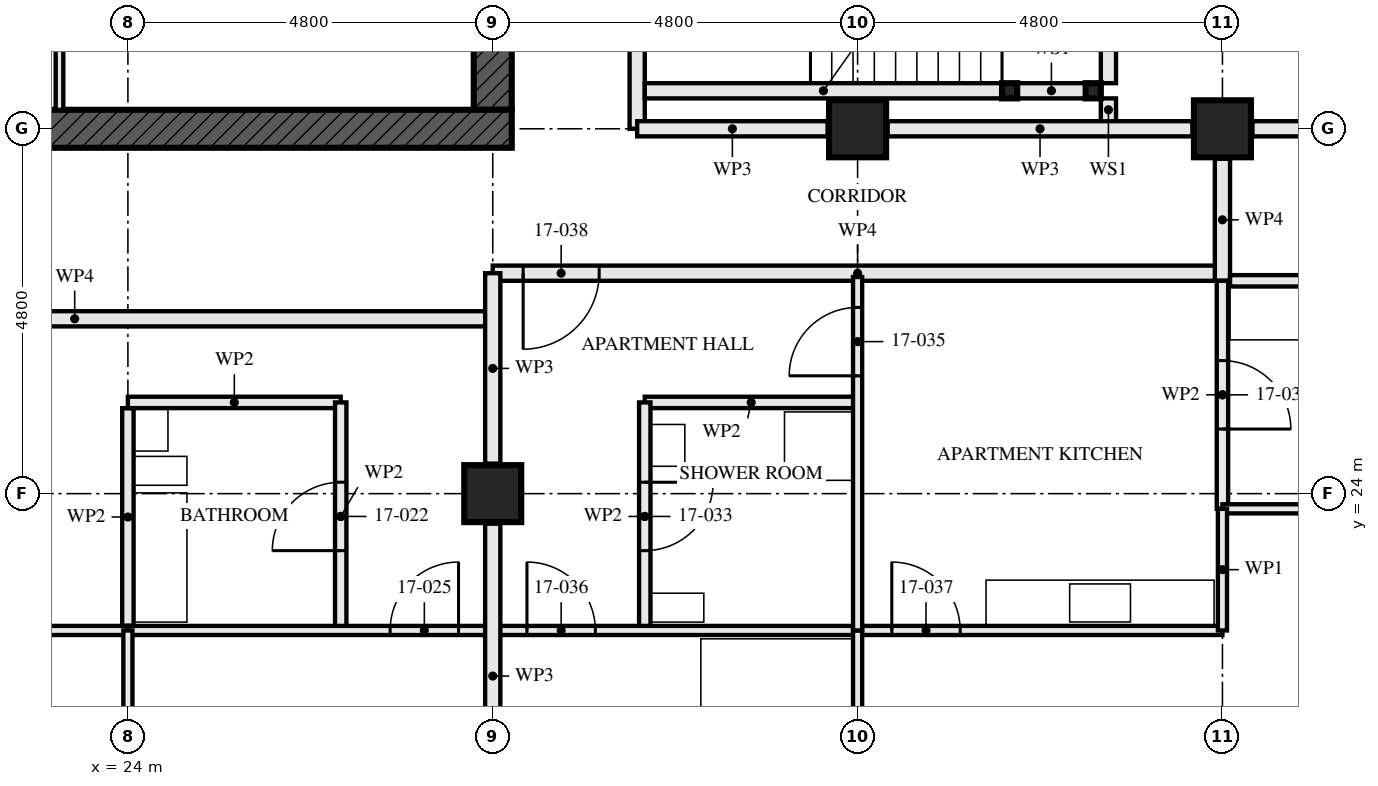
"""IFC4 building model, lengths in metres.
Left out: names, types, materials, properties, quantities, classifications, styles, units other than length and angle.
Written with IfcOpenShell. Run it as: python <this file> out.ifc"""

import sys

from ifc_helpers import new_model, si_unit, direction, frame, frame_2d, origin, origin_2d, place, context, subcontext, project, spatial, rectangle, hollow_rectangle, extrude, element, fill, save


model = new_model("IFC4")
c1 = context("Model", 3, precision=1e-05, world=origin(), true_north=direction((0.0, 1.0)))
c2 = subcontext(c1, "Body", "Model", "MODEL_VIEW")
j1 = project(units=[si_unit("LENGTHUNIT", "METRE"), si_unit("PLANEANGLEUNIT", "RADIAN")], contexts=[c1])
p1 = place(None, origin())
s1 = spatial("IfcSite", under=j1, at=p1, CompositionType="ELEMENT")
p2 = place(p1, origin())
s2 = spatial("IfcBuilding", under=s1, at=p2, CompositionType="ELEMENT")
p3 = place(p2, frame((0.0, 0.0, 65.5)))
s3 = spatial("IfcBuildingStorey", under=s2, at=p3, CompositionType="ELEMENT", Elevation=65.5)
for number, where, z_axis, x_axis in (
    (1, (28.8, 24.0, 0.0), (0.0, 0.0, 1.0), (1.0, 0.0, 0.0)),
    (2, (33.6, 28.8, 0.0), (0.0, 0.0, 1.0), (0.0, 1.0, 0.0)),
    (3, (38.4, 28.8, 0.0), (0.0, 0.0, 1.0), (0.0, 1.0, 0.0)),
):
    element("IfcColumn", number, at=place(p3, frame(where, z_axis=z_axis, x_axis=x_axis)), inside=s3, PredefinedType="COLUMN", context=c2, shape_type="SweptSolid", body=[
        extrude(hollow_rectangle(XDim=0.75, YDim=0.75, WallThickness=0.08, at=origin_2d()), origin(), (0.0, 0.0, 1.0), 3.5),
    ])
p4 = place(p3, frame((14.15, 28.8, -0.17), z_axis=(0.0, 0.0, 1.0), x_axis=(1.0, 0.0, 0.0)))
e4 = element("IfcWall", 4, at=p4, inside=s3, PredefinedType="SHEAR", context=c2, shape_type="SweptSolid", body=[
    extrude(rectangle(XDim=14.9, YDim=0.5, at=frame_2d((7.45, 0.0))), origin(), (0.0, 0.0, 1.0), 3.5),
])
p5 = place(p4, frame((6.85, 0.0, 0.17)))
e5 = element("IfcOpeningElement", 5, at=p5, cuts=e4, PredefinedType="OPENING", context=c2, shape_type="SweptSolid", body=[
    extrude(rectangle(XDim=1.2, YDim=2.1, at=frame_2d((0.6, 1.05))), frame((0.0, 0.26, 0.0), z_axis=(0.0, -1.0, 0.0), x_axis=(1.0, 0.0, 0.0)), (0.0, 0.0, 1.0), 0.521),
])
p6 = place(p3, frame((28.8, 29.05, -0.17), z_axis=(0.0, 0.0, 1.0), x_axis=(0.0, 1.0, 0.0)))
e6 = element("IfcWall", 6, at=p6, inside=s3, PredefinedType="SHEAR", context=c2, shape_type="SweptSolid", body=[
    extrude(rectangle(XDim=13.9, YDim=0.5, at=frame_2d((6.95, 0.0))), origin(), (0.0, 0.0, 1.0), 3.5),
])
p7 = place(p6, frame((6.35, 0.0, 0.17)))
e7 = element("IfcOpeningElement", 7, at=p7, cuts=e6, PredefinedType="OPENING", context=c2, shape_type="SweptSolid", body=[
    extrude(rectangle(XDim=1.2, YDim=2.1, at=frame_2d((0.6, 1.05))), frame((0.0, 0.26, 0.0), z_axis=(0.0, -1.0, 0.0), x_axis=(1.0, 0.0, 0.0)), (0.0, 0.0, 1.0), 0.521),
])
for number, where, z_axis, x_axis in (
    (8, (36.7, 29.3, 0.0), (0.0, 0.0, 1.0), (1.0, 0.0, 0.0)),
    (9, (35.6, 29.3, 0.0), (0.0, 0.0, 1.0), (1.0, 0.0, 0.0)),
):
    element("IfcColumn", number, at=place(p3, frame(where, z_axis=z_axis, x_axis=x_axis)), inside=s3, PredefinedType="COLUMN", context=c2, shape_type="SweptSolid", body=[
        extrude(hollow_rectangle(XDim=0.2, YDim=0.2, WallThickness=0.008, at=origin_2d()), origin(), (0.0, 0.0, 1.0), 3.33),
    ])
p8 = place(p3, frame((26.8, 22.2, 0.0), z_axis=(0.0, 0.0, 1.0), x_axis=(0.0, 1.0, 0.0)))
e10 = element("IfcWall", 10, at=p8, inside=s3, PredefinedType="PARTITIONING", context=c2, shape_type="SweptSolid", body=[
    extrude(rectangle(XDim=3.0, YDim=0.15, at=frame_2d((1.5, 0.0))), origin(), (0.0, 0.0, 1.0), 2.55),
])
p9 = place(p8, frame((1.05, 0.0, 0.0)))
e11 = element("IfcOpeningElement", 11, at=p9, cuts=e10, PredefinedType="OPENING", context=c2, shape_type="SweptSolid", body=[
    extrude(rectangle(XDim=0.9, YDim=2.1, at=frame_2d((0.45, 1.05))), frame((0.0, 0.085, 0.0), z_axis=(0.0, -1.0, 0.0), x_axis=(1.0, 0.0, 0.0)), (0.0, 0.0, 1.0), 0.171),
])
p10 = place(p3, frame((24.0, 25.2, 0.0), z_axis=(0.0, 0.0, 1.0), x_axis=(1.0, 0.0, 0.0)))
e12 = element("IfcWall", 12, at=p10, inside=s3, PredefinedType="PARTITIONING", context=c2, shape_type="SweptSolid", body=[
    extrude(rectangle(XDim=2.8, YDim=0.15, at=frame_2d((1.4, 0.0))), origin(), (0.0, 0.0, 1.0), 3.33),
])
p11 = place(p3, frame((19.2, 22.2, 0.0), z_axis=(0.0, 0.0, 1.0), x_axis=(1.0, 0.0, 0.0)))
e13 = element("IfcWall", 13, at=p11, inside=s3, PredefinedType="PARTITIONING", context=c2, shape_type="SweptSolid", body=[
    extrude(rectangle(XDim=4.8, YDim=0.12, at=frame_2d((2.4, 0.0))), origin(), (0.0, 0.0, 1.0), 3.33),
])
p12 = place(p11, frame((0.45, 0.0, 0.0)))
e14 = element("IfcOpeningElement", 14, at=p12, cuts=e13, PredefinedType="OPENING", context=c2, shape_type="SweptSolid", body=[
    extrude(rectangle(XDim=0.9, YDim=2.1, at=frame_2d((0.45, 1.05))), frame((0.0, 0.071, 0.0), z_axis=(0.0, -1.0, 0.0), x_axis=(1.0, 0.0, 0.0)), (0.0, 0.0, 1.0), 0.141),
])
p13 = place(p3, frame((24.0, 22.2, 0.0), z_axis=(0.0, 0.0, 1.0), x_axis=(1.0, 0.0, 0.0)))
e15 = element("IfcWall", 15, at=p13, inside=s3, PredefinedType="PARTITIONING", context=c2, shape_type="SweptSolid", body=[
    extrude(rectangle(XDim=4.8, YDim=0.12, at=frame_2d((2.4, 0.0))), origin(), (0.0, 0.0, 1.0), 3.33),
])
p14 = place(p13, frame((3.45, 0.0, 0.0)))
e16 = element("IfcOpeningElement", 16, at=p14, cuts=e15, PredefinedType="OPENING", context=c2, shape_type="SweptSolid", body=[
    extrude(rectangle(XDim=0.9, YDim=2.1, at=frame_2d((0.45, 1.05))), frame((0.0, 0.071, 0.0), z_axis=(0.0, -1.0, 0.0), x_axis=(1.0, 0.0, 0.0)), (0.0, 0.0, 1.0), 0.141),
])
p15 = place(p3, frame((24.0, 14.72, 0.0), z_axis=(0.0, 0.0, 1.0), x_axis=(0.0, 1.0, 0.0)))
e17 = element("IfcWall", 17, at=p15, inside=s3, PredefinedType="PARTITIONING", context=c2, shape_type="SweptSolid", body=[
    extrude(rectangle(XDim=7.48, YDim=0.12, at=frame_2d((3.74, 0.0))), origin(), (0.0, 0.0, 1.0), 2.55),
])
p16 = place(p3, frame((17.8, 26.3, 0.0), z_axis=(0.0, 0.0, 1.0), x_axis=(1.0, 0.0, 0.0)))
e18 = element("IfcWall", 18, at=p16, inside=s3, PredefinedType="PARTITIONING", context=c2, shape_type="SweptSolid", body=[
    extrude(rectangle(XDim=11.0, YDim=0.2, at=frame_2d((5.5, 0.0))), origin(), (0.0, 0.0, 1.0), 2.55),
])
p17 = place(p16, frame((0.06, 0.0, 0.0)))
e19 = element("IfcOpeningElement", 19, at=p17, cuts=e18, PredefinedType="OPENING", context=c2, shape_type="SweptSolid", body=[
    extrude(rectangle(XDim=1.0, YDim=2.1, at=frame_2d((0.5, 1.05))), frame((0.0, 0.111, 0.0), z_axis=(0.0, -1.0, 0.0), x_axis=(1.0, 0.0, 0.0)), (0.0, 0.0, 1.0), 0.221),
])
p18 = place(p3, frame((30.8, 22.2, 0.0), z_axis=(0.0, 0.0, 1.0), x_axis=(0.0, 1.0, 0.0)))
e20 = element("IfcWall", 20, at=p18, inside=s3, PredefinedType="PARTITIONING", context=c2, shape_type="SweptSolid", body=[
    extrude(rectangle(XDim=3.0, YDim=0.15, at=frame_2d((1.5, 0.0))), origin(), (0.0, 0.0, 1.0), 2.55),
])
p19 = place(p18, frame((1.05, 0.0, 0.0)))
e21 = element("IfcOpeningElement", 21, at=p19, cuts=e20, PredefinedType="OPENING", context=c2, shape_type="SweptSolid", body=[
    extrude(rectangle(XDim=0.9, YDim=2.1, at=frame_2d((0.45, 1.05))), frame((0.0, 0.085, 0.0), z_axis=(0.0, -1.0, 0.0), x_axis=(1.0, 0.0, 0.0)), (0.0, 0.0, 1.0), 0.171),
])
p20 = place(p3, frame((30.8, 25.2, 0.0), z_axis=(0.0, 0.0, 1.0), x_axis=(1.0, 0.0, 0.0)))
e22 = element("IfcWall", 22, at=p20, inside=s3, PredefinedType="PARTITIONING", context=c2, shape_type="SweptSolid", body=[
    extrude(rectangle(XDim=2.8, YDim=0.15, at=frame_2d((1.4, 0.0))), origin(), (0.0, 0.0, 1.0), 3.33),
])
p21 = place(p3, frame((38.4, 23.8, 0.0), z_axis=(0.0, 0.0, 1.0), x_axis=(0.0, 1.0, 0.0)))
e23 = element("IfcWall", 23, at=p21, inside=s3, PredefinedType="PARTITIONING", context=c2, shape_type="SweptSolid", body=[
    extrude(rectangle(XDim=3.0, YDim=0.15, at=frame_2d((1.5, 0.0))), origin(), (0.0, 0.0, 1.0), 2.55),
])
p22 = place(p21, frame((1.05, 0.0, 0.0)))
e24 = element("IfcOpeningElement", 24, at=p22, cuts=e23, PredefinedType="OPENING", context=c2, shape_type="SweptSolid", body=[
    extrude(rectangle(XDim=0.9, YDim=2.1, at=frame_2d((0.45, 1.05))), frame((0.0, 0.085, 0.0), z_axis=(0.0, -1.0, 0.0), x_axis=(1.0, 0.0, 0.0)), (0.0, 0.0, 1.0), 0.171),
])
p23 = place(p3, frame((33.6, 22.2, 0.0), z_axis=(0.0, 0.0, 1.0), x_axis=(0.0, 1.0, 0.0)))
e25 = element("IfcWall", 25, at=p23, inside=s3, PredefinedType="PARTITIONING", context=c2, shape_type="SweptSolid", body=[
    extrude(rectangle(XDim=4.65, YDim=0.12, at=frame_2d((2.325, 0.0))), origin(), (0.0, 0.0, 1.0), 2.55),
])
p24 = place(p23, frame((3.35, 0.0, 0.0)))
e26 = element("IfcOpeningElement", 26, at=p24, cuts=e25, PredefinedType="OPENING", context=c2, shape_type="SweptSolid", body=[
    extrude(rectangle(XDim=0.9, YDim=2.1, at=frame_2d((0.45, 1.05))), frame((0.0, 0.071, 0.0), z_axis=(0.0, -1.0, 0.0), x_axis=(1.0, 0.0, 0.0)), (0.0, 0.0, 1.0), 0.141),
])
p25 = place(p3, frame((28.8, 22.2, 0.0), z_axis=(0.0, 0.0, 1.0), x_axis=(1.0, 0.0, 0.0)))
e27 = element("IfcWall", 27, at=p25, inside=s3, PredefinedType="PARTITIONING", context=c2, shape_type="SweptSolid", body=[
    extrude(rectangle(XDim=4.8, YDim=0.12, at=frame_2d((2.4, 0.0))), origin(), (0.0, 0.0, 1.0), 3.33),
])
p26 = place(p25, frame((0.45, 0.0, 0.0)))
e28 = element("IfcOpeningElement", 28, at=p26, cuts=e27, PredefinedType="OPENING", context=c2, shape_type="SweptSolid", body=[
    extrude(rectangle(XDim=0.9, YDim=2.1, at=frame_2d((0.45, 1.05))), frame((0.0, 0.071, 0.0), z_axis=(0.0, -1.0, 0.0), x_axis=(1.0, 0.0, 0.0)), (0.0, 0.0, 1.0), 0.141),
])
p27 = place(p3, frame((33.6, 22.2, 0.0), z_axis=(0.0, 0.0, 1.0), x_axis=(1.0, 0.0, 0.0)))
e29 = element("IfcWall", 29, at=p27, inside=s3, PredefinedType="PARTITIONING", context=c2, shape_type="SweptSolid", body=[
    extrude(rectangle(XDim=4.8, YDim=0.12, at=frame_2d((2.4, 0.0))), origin(), (0.0, 0.0, 1.0), 3.33),
])
p28 = place(p27, frame((0.45, 0.0, 0.0)))
e30 = element("IfcOpeningElement", 30, at=p28, cuts=e29, PredefinedType="OPENING", context=c2, shape_type="SweptSolid", body=[
    extrude(rectangle(XDim=0.9, YDim=2.1, at=frame_2d((0.45, 1.05))), frame((0.0, 0.071, 0.0), z_axis=(0.0, -1.0, 0.0), x_axis=(1.0, 0.0, 0.0)), (0.0, 0.0, 1.0), 0.141),
])
p29 = place(p3, frame((38.4, 23.8, 0.0), z_axis=(0.0, 0.0, 1.0), x_axis=(1.0, 0.0, 0.0)))
e31 = element("IfcWall", 31, at=p29, inside=s3, PredefinedType="PARTITIONING", context=c2, shape_type="SweptSolid", body=[
    extrude(rectangle(XDim=4.48, YDim=0.12, at=frame_2d((2.24, 0.0))), origin(), (0.0, 0.0, 1.0), 3.33),
])
p30 = place(p3, frame((33.6, 14.72, 0.0), z_axis=(0.0, 0.0, 1.0), x_axis=(0.0, 1.0, 0.0)))
e32 = element("IfcWall", 32, at=p30, inside=s3, PredefinedType="PARTITIONING", context=c2, shape_type="SweptSolid", body=[
    extrude(rectangle(XDim=7.48, YDim=0.12, at=frame_2d((3.74, 0.0))), origin(), (0.0, 0.0, 1.0), 2.55),
])
p31 = place(p3, frame((38.4, 22.2, 0.0), z_axis=(0.0, 0.0, 1.0), x_axis=(0.0, 1.0, 0.0)))
e33 = element("IfcWall", 33, at=p31, inside=s3, PredefinedType="PARTITIONING", context=c2, shape_type="SweptSolid", body=[
    extrude(rectangle(XDim=1.6, YDim=0.12, at=frame_2d((0.8, 0.0))), origin(), (0.0, 0.0, 1.0), 3.33),
])
p32 = place(p3, frame((28.8, 26.9, 0.0), z_axis=(0.0, 0.0, 1.0), x_axis=(1.0, 0.0, 0.0)))
e34 = element("IfcWall", 34, at=p32, inside=s3, PredefinedType="PARTITIONING", context=c2, shape_type="SweptSolid", body=[
    extrude(rectangle(XDim=9.6, YDim=0.2, at=frame_2d((4.8, 0.0))), origin(), (0.0, 0.0, 1.0), 3.33),
])
p33 = place(p32, frame((0.4, 0.0, 0.0)))
e35 = element("IfcOpeningElement", 35, at=p33, cuts=e34, PredefinedType="OPENING", context=c2, shape_type="SweptSolid", body=[
    extrude(rectangle(XDim=1.0, YDim=2.1, at=frame_2d((0.5, 1.05))), frame((0.0, 0.111, 0.0), z_axis=(0.0, -1.0, 0.0), x_axis=(1.0, 0.0, 0.0)), (0.0, 0.0, 1.0), 0.221),
])
p34 = place(p3, frame((38.4, 26.8, 0.0), z_axis=(0.0, 0.0, 1.0), x_axis=(0.0, 1.0, 0.0)))
e36 = element("IfcWall", 36, at=p34, inside=s3, PredefinedType="PARTITIONING", context=c2, shape_type="SweptSolid", body=[
    extrude(rectangle(XDim=1.605, YDim=0.2, at=frame_2d((0.802, 0.0))), origin(), (0.0, 0.0, 1.0), 3.33),
])
p35 = place(p3, frame((36.6, 29.3, 0.0), z_axis=(0.0, 0.0, 1.0), x_axis=(-1.0, 0.0, 0.0)))
e37 = element("IfcWall", 37, at=p35, inside=s3, PredefinedType="SOLIDWALL", context=c2, shape_type="SweptSolid", body=[
    extrude(rectangle(XDim=0.9, YDim=0.2, at=frame_2d((0.45, 0.0))), origin(), (0.0, 0.0, 1.0), 2.99),
])
p36 = place(p3, frame((35.5, 29.3, 0.0), z_axis=(0.0, 0.0, 1.0), x_axis=(-1.0, 0.0, 0.0)))
e38 = element("IfcWall", 38, at=p36, inside=s3, PredefinedType="SOLIDWALL", context=c2, shape_type="SweptSolid", body=[
    extrude(rectangle(XDim=4.7, YDim=0.2, at=frame_2d((2.35, 0.0))), origin(), (0.0, 0.0, 1.0), 2.99),
])
p37 = place(p3, frame((36.9, 28.9, 0.0), z_axis=(0.0, 0.0, 1.0), x_axis=(0.0, 1.0, 0.0)))
e39 = element("IfcWall", 39, at=p37, inside=s3, PredefinedType="SOLIDWALL", context=c2, shape_type="SweptSolid", body=[
    extrude(rectangle(XDim=0.3, YDim=0.2, at=frame_2d((0.15, 0.0))), origin(), (0.0, 0.0, 1.0), 3.33),
])
p38 = place(p3, frame((36.9, 29.4, 0.0), z_axis=(0.0, 0.0, 1.0), x_axis=(0.0, 1.0, 0.0)))
e40 = element("IfcWall", 40, at=p38, inside=s3, PredefinedType="SOLIDWALL", context=c2, shape_type="SweptSolid", body=[
    extrude(rectangle(XDim=2.6, YDim=0.2, at=frame_2d((1.3, 0.0))), origin(), (0.0, 0.0, 1.0), 3.33),
])
p39 = place(p3, frame((30.7, 28.8, 0.0), z_axis=(0.0, 0.0, 1.0), x_axis=(0.0, 1.0, 0.0)))
e41 = element("IfcWall", 41, at=p39, inside=s3, PredefinedType="PARTITIONING", context=c2, shape_type="SweptSolid", body=[
    extrude(rectangle(XDim=14.4, YDim=0.2, at=frame_2d((7.2, 0.0))), origin(), (0.0, 0.0, 1.0), 2.55),
])
p40 = place(p39, frame((1.4, 0.0, 0.0)))
e42 = element("IfcOpeningElement", 42, at=p40, cuts=e41, PredefinedType="OPENING", context=c2, shape_type="SweptSolid", body=[
    extrude(rectangle(XDim=1.0, YDim=2.1, at=frame_2d((0.5, 1.05))), frame((0.0, 0.111, 0.0), z_axis=(0.0, -1.0, 0.0), x_axis=(1.0, 0.0, 0.0)), (0.0, 0.0, 1.0), 0.221),
])
p41 = place(p39, frame((4.1, 0.0, 0.0)))
e43 = element("IfcOpeningElement", 43, at=p41, cuts=e41, PredefinedType="OPENING", context=c2, shape_type="SweptSolid", body=[
    extrude(rectangle(XDim=1.0, YDim=2.1, at=frame_2d((0.5, 1.05))), frame((0.0, 0.111, 0.0), z_axis=(0.0, -1.0, 0.0), x_axis=(1.0, 0.0, 0.0)), (0.0, 0.0, 1.0), 0.221),
])
p42 = place(p39, frame((10.0, 0.0, 0.0)))
e44 = element("IfcOpeningElement", 44, at=p42, cuts=e41, PredefinedType="OPENING", context=c2, shape_type="SweptSolid", body=[
    extrude(rectangle(XDim=1.0, YDim=2.1, at=frame_2d((0.5, 1.05))), frame((0.0, 0.111, 0.0), z_axis=(0.0, -1.0, 0.0), x_axis=(1.0, 0.0, 0.0)), (0.0, 0.0, 1.0), 0.221),
])
p43 = place(p3, frame((23.1, 29.05, 0.0), z_axis=(0.0, 0.0, 1.0), x_axis=(0.0, 1.0, 0.0)))
e45 = element("IfcWall", 45, at=p43, inside=s3, PredefinedType="SOLIDWALL", context=c2, shape_type="SweptSolid", body=[
    extrude(rectangle(XDim=5.8, YDim=0.1, at=frame_2d((2.9, 0.0))), origin(), (0.0, 0.0, 1.0), 3.33),
])
p44 = place(p43, frame((1.0, 0.0, 0.0)))
e46 = element("IfcOpeningElement", 46, at=p44, cuts=e45, PredefinedType="OPENING", context=c2, shape_type="SweptSolid", body=[
    extrude(rectangle(XDim=0.7, YDim=2.1, at=frame_2d((0.35, 1.05))), frame((0.0, 0.061, 0.0), z_axis=(0.0, -1.0, 0.0), x_axis=(1.0, 0.0, 0.0)), (0.0, 0.0, 1.0), 0.121),
])
p45 = place(p3, frame((28.8, 19.595, 0.0), z_axis=(0.0, 0.0, 1.0), x_axis=(0.0, 1.0, 0.0)))
e47 = element("IfcWall", 47, at=p45, inside=s3, PredefinedType="PARTITIONING", context=c2, shape_type="SweptSolid", body=[
    extrude(rectangle(XDim=4.01, YDim=0.2, at=frame_2d((2.005, 0.0))), origin(), (0.0, 0.0, 1.0), 2.32),
])
p46 = place(p3, frame((28.8, 24.395, 0.0), z_axis=(0.0, 0.0, 1.0), x_axis=(0.0, 1.0, 0.0)))
e48 = element("IfcWall", 48, at=p46, inside=s3, PredefinedType="PARTITIONING", context=c2, shape_type="SweptSolid", body=[
    extrude(rectangle(XDim=2.505, YDim=0.2, at=frame_2d((1.252, 0.0))), origin(), (0.0, 0.0, 1.0), 2.32),
])
p47 = place(p3, frame((42.88, 28.8, 0.0), z_axis=(0.0, 0.0, 1.0), x_axis=(-1.0, 0.0, 0.0)))
e49 = element("IfcWall", 49, at=p47, inside=s3, PredefinedType="PARTITIONING", context=c2, shape_type="SweptSolid", body=[
    extrude(rectangle(XDim=4.085, YDim=0.2, at=frame_2d((2.042, 0.0))), origin(), (0.0, 0.0, 1.0), 2.32),
])
p48 = place(p3, frame((38.005, 28.8, 0.0), z_axis=(0.0, 0.0, 1.0), x_axis=(-1.0, 0.0, 0.0)))
e50 = element("IfcWall", 50, at=p48, inside=s3, PredefinedType="PARTITIONING", context=c2, shape_type="SweptSolid", body=[
    extrude(rectangle(XDim=4.01, YDim=0.2, at=frame_2d((2.005, 0.0))), origin(), (0.0, 0.0, 1.0), 2.32),
])
p49 = place(p3, frame((33.205, 28.8, 0.0), z_axis=(0.0, 0.0, 1.0), x_axis=(-1.0, 0.0, 0.0)))
e51 = element("IfcWall", 51, at=p49, inside=s3, PredefinedType="PARTITIONING", context=c2, shape_type="SweptSolid", body=[
    extrude(rectangle(XDim=2.505, YDim=0.2, at=frame_2d((1.252, 0.0))), origin(), (0.0, 0.0, 1.0), 2.32),
])
p50 = place(p3, frame((24.0, 22.26, 0.0), z_axis=(0.0, 0.0, 1.0), x_axis=(0.0, 1.0, 0.0)))
e52 = element("IfcWall", 52, at=p50, inside=s3, PredefinedType="PARTITIONING", context=c2, shape_type="SweptSolid", body=[
    extrude(rectangle(XDim=2.865, YDim=0.15, at=frame_2d((1.433, 0.0))), origin(), (0.0, 0.0, 1.0), 2.55),
])
p51 = place(p3, frame((38.5, 26.8, 0.0), z_axis=(0.0, 0.0, 1.0), x_axis=(1.0, 0.0, 0.0)))
e53 = element("IfcWall", 53, at=p51, inside=s3, PredefinedType="PARTITIONING", context=c2, shape_type="SweptSolid", body=[
    extrude(rectangle(XDim=5.13, YDim=0.15, at=frame_2d((2.565, 0.0))), origin(), (0.0, 0.0, 1.0), 2.32),
])
p52 = place(p9, origin())
e54 = element("IfcDoor", 54, at=p52, inside=s3, OperationType="SINGLE_SWING_RIGHT", PredefinedType="DOOR", context=c2, shape_type="SweptSolid", body=[
    extrude(rectangle(XDim=0.9, YDim=2.1, at=frame_2d((0.45, 1.05))), frame((0.0, 0.022, 0.0), z_axis=(0.0, -1.0, 0.0), x_axis=(1.0, 0.0, 0.0)), (0.0, 0.0, 1.0), 0.044),
])
fill(e11, e54)
p53 = place(p14, origin())
e55 = element("IfcDoor", 55, at=p53, inside=s3, OperationType="SINGLE_SWING_LEFT", PredefinedType="DOOR", context=c2, shape_type="SweptSolid", body=[
    extrude(rectangle(XDim=0.9, YDim=2.1, at=frame_2d((0.45, 1.05))), frame((0.0, 0.022, 0.0), z_axis=(0.0, -1.0, 0.0), x_axis=(1.0, 0.0, 0.0)), (0.0, 0.0, 1.0), 0.044),
])
fill(e16, e55)
p54 = place(p19, frame((0.9, 0.0, 0.0), z_axis=(0.0, 0.0, 1.0), x_axis=(-1.0, 0.0, 0.0)))
e56 = element("IfcDoor", 56, at=p54, inside=s3, OperationType="SINGLE_SWING_RIGHT", PredefinedType="DOOR", context=c2, shape_type="SweptSolid", body=[
    extrude(rectangle(XDim=0.9, YDim=2.1, at=frame_2d((0.45, 1.05))), frame((0.0, 0.022, 0.0), z_axis=(0.0, -1.0, 0.0), x_axis=(1.0, 0.0, 0.0)), (0.0, 0.0, 1.0), 0.044),
])
fill(e21, e56)
p55 = place(p22, frame((0.9, 0.0, 0.0), z_axis=(0.0, 0.0, 1.0), x_axis=(-1.0, 0.0, 0.0)))
e57 = element("IfcDoor", 57, at=p55, inside=s3, OperationType="SINGLE_SWING_LEFT", PredefinedType="DOOR", context=c2, shape_type="SweptSolid", body=[
    extrude(rectangle(XDim=0.9, YDim=2.1, at=frame_2d((0.45, 1.05))), frame((0.0, 0.022, 0.0), z_axis=(0.0, -1.0, 0.0), x_axis=(1.0, 0.0, 0.0)), (0.0, 0.0, 1.0), 0.044),
])
fill(e24, e57)
p56 = place(p24, origin())
e58 = element("IfcDoor", 58, at=p56, inside=s3, OperationType="SINGLE_SWING_RIGHT", PredefinedType="DOOR", context=c2, shape_type="SweptSolid", body=[
    extrude(rectangle(XDim=0.9, YDim=2.1, at=frame_2d((0.45, 1.05))), frame((0.0, 0.022, 0.0), z_axis=(0.0, -1.0, 0.0), x_axis=(1.0, 0.0, 0.0)), (0.0, 0.0, 1.0), 0.044),
])
fill(e26, e58)
p57 = place(p26, origin())
e59 = element("IfcDoor", 59, at=p57, inside=s3, OperationType="SINGLE_SWING_RIGHT", PredefinedType="DOOR", context=c2, shape_type="SweptSolid", body=[
    extrude(rectangle(XDim=0.9, YDim=2.1, at=frame_2d((0.45, 1.05))), frame((0.0, 0.022, 0.0), z_axis=(0.0, -1.0, 0.0), x_axis=(1.0, 0.0, 0.0)), (0.0, 0.0, 1.0), 0.044),
])
fill(e28, e59)
p58 = place(p28, origin())
e60 = element("IfcDoor", 60, at=p58, inside=s3, OperationType="SINGLE_SWING_RIGHT", PredefinedType="DOOR", context=c2, shape_type="SweptSolid", body=[
    extrude(rectangle(XDim=0.9, YDim=2.1, at=frame_2d((0.45, 1.05))), frame((0.0, 0.022, 0.0), z_axis=(0.0, -1.0, 0.0), x_axis=(1.0, 0.0, 0.0)), (0.0, 0.0, 1.0), 0.044),
])
fill(e30, e60)
p59 = place(p33, frame((1.0, 0.0, 0.0), z_axis=(0.0, 0.0, 1.0), x_axis=(-1.0, 0.0, 0.0)))
e61 = element("IfcDoor", 61, at=p59, inside=s3, OperationType="SINGLE_SWING_LEFT", PredefinedType="DOOR", context=c2, shape_type="SweptSolid", body=[
    extrude(rectangle(XDim=1.0, YDim=2.1, at=frame_2d((0.5, 1.05))), frame((0.0, 0.027, 0.0), z_axis=(0.0, -1.0, 0.0), x_axis=(1.0, 0.0, 0.0)), (0.0, 0.0, 1.0), 0.054),
])
fill(e35, e61)
save(model, sys.argv[1])
